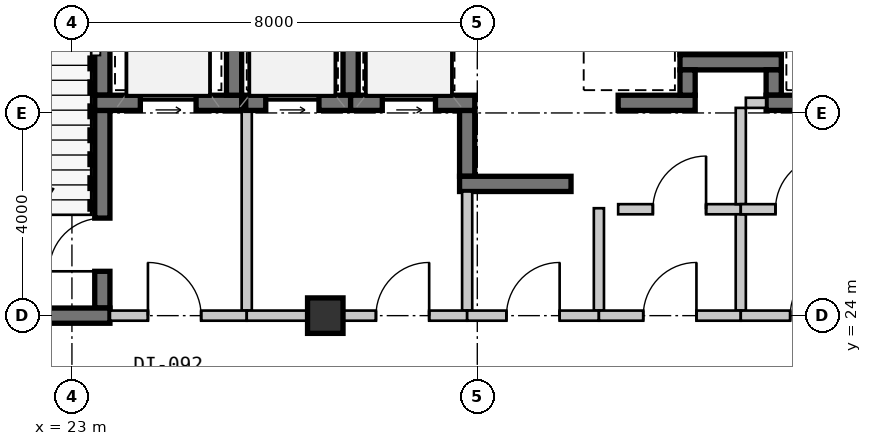
"""IFC4 building model, lengths in metres.
Left out: names, types, materials, properties, quantities, classifications, styles, units other than length and angle.
Written with IfcOpenShell. Run it as: python <this file> out.ifc"""

import sys

from ifc_helpers import new_model, si_unit, direction, frame, frame_2d, origin, origin_2d, place, context, subcontext, project, spatial, rectangle, extrude, source, transform, mapped, element, fill, save


model = new_model("IFC4")
c1 = context("Model", 3, precision=1e-05, world=origin(), true_north=direction((0.0, 1.0)))
c2 = subcontext(c1, "Body", "Model", "MODEL_VIEW")
j1 = project(units=[si_unit("LENGTHUNIT", "METRE"), si_unit("PLANEANGLEUNIT", "RADIAN")], contexts=[c1])
p1 = place(None, origin())
s1 = spatial("IfcSite", under=j1, at=p1, CompositionType="ELEMENT")
p2 = place(p1, origin())
s2 = spatial("IfcBuilding", under=s1, at=p2, CompositionType="ELEMENT")
p3 = place(p2, frame((0.0, 0.0, 80.85)))
s3 = spatial("IfcBuildingStorey", under=s2, at=p3, CompositionType="ELEMENT", Elevation=80.85)
m1 = source(origin(), c2, "Body", "SweptSolid", [
    extrude(rectangle(XDim=0.7, YDim=0.7, at=origin_2d()), origin(), (0.0, 0.0, 1.0), 3.15),
])
p4 = place(p3, frame((28.0, 24.0, 0.0), z_axis=(0.0, 0.0, 1.0), x_axis=(1.0, 0.0, 0.0)))
e1 = element("IfcColumn", 1, at=p4, inside=s3, PredefinedType="COLUMN", context=c2, shape_type="MappedRepresentation", body=[
    mapped(m1, transform((0.0, 0.0, 0.0), scale=1.0)),
])
m2 = source(origin(), c2, "Body", "SweptSolid", [
    extrude(rectangle(XDim=3.5, YDim=0.3, at=frame_2d((1.75, 0.0))), origin(), (0.0, 0.0, 1.0), 2.93),
])
p5 = place(p3, frame((23.6, 28.35, 0.0), z_axis=(0.0, 0.0, 1.0), x_axis=(0.0, 1.0, 0.0)))
e2 = element("IfcWall", 2, at=p5, inside=s3, PredefinedType="SHEAR", context=c2, shape_type="MappedRepresentation", body=[
    mapped(m2, transform((0.0, 0.0, 0.0), scale=1.0)),
])
m3 = source(origin(), c2, "Body", "SweptSolid", [
    extrude(rectangle(XDim=3.9, YDim=0.3, at=frame_2d((1.95, 0.0))), origin(), (0.0, 0.0, 1.0), 2.93),
])
p6 = place(p3, frame((23.6, 24.15, 0.0), z_axis=(0.0, 0.0, 1.0), x_axis=(0.0, 1.0, 0.0)))
e3 = element("IfcWall", 3, at=p6, inside=s3, PredefinedType="SHEAR", context=c2, shape_type="MappedRepresentation", body=[
    mapped(m3, transform((0.0, 0.0, 0.0), scale=1.0)),
])
m4 = source(origin(), c2, "Body", "SweptSolid", [
    extrude(rectangle(XDim=1.05, YDim=2.1, at=frame_2d((0.525, 1.05))), frame((0.0, 0.16, 0.0), z_axis=(0.0, -1.0, 0.0), x_axis=(1.0, 0.0, 0.0)), (0.0, 0.0, 1.0), 0.32),
])
p7 = place(p6, frame((0.725, 0.0, 0.0)))
e4 = element("IfcOpeningElement", 4, at=p7, cuts=e3, PredefinedType="OPENING", context=c2, shape_type="MappedRepresentation", body=[
    mapped(m4, transform((0.0, 0.0, 0.0), scale=1.0)),
])
m5 = source(origin(), c2, "Body", "SweptSolid", [
    extrude(rectangle(XDim=4.9, YDim=0.3, at=frame_2d((2.45, 0.0))), origin(), (0.0, 0.0, 1.0), 2.93),
])
p8 = place(p3, frame((18.85, 24.0, 0.0), z_axis=(0.0, 0.0, 1.0), x_axis=(1.0, 0.0, 0.0)))
e5 = element("IfcWall", 5, at=p8, inside=s3, PredefinedType="SHEAR", context=c2, shape_type="MappedRepresentation", body=[
    mapped(m5, transform((0.0, 0.0, 0.0), scale=1.0)),
])
m6 = source(origin(), c2, "Body", "SweptSolid", [
    extrude(rectangle(XDim=2.9, YDim=0.3, at=frame_2d((1.45, 0.0))), origin(), (0.0, 0.0, 1.0), 2.93),
])
p9 = place(p3, frame((23.45, 28.2, 0.0), z_axis=(0.0, 0.0, 1.0), x_axis=(1.0, 0.0, 0.0)))
e6 = element("IfcWall", 6, at=p9, inside=s3, PredefinedType="SHEAR", context=c2, shape_type="MappedRepresentation", body=[
    mapped(m6, transform((0.0, 0.0, 0.0), scale=1.0)),
])
m7 = source(origin(), c2, "Body", "SweptSolid", [
    extrude(rectangle(XDim=1.1, YDim=2.15, at=frame_2d((0.55, 1.075))), frame((0.0, 0.16, 0.0), z_axis=(0.0, -1.0, 0.0), x_axis=(1.0, 0.0, 0.0)), (0.0, 0.0, 1.0), 0.32),
])
p10 = place(p9, frame((0.9, 0.0, 0.0)))
e7 = element("IfcOpeningElement", 7, at=p10, cuts=e6, PredefinedType="OPENING", context=c2, shape_type="MappedRepresentation", body=[
    mapped(m7, transform((0.0, 0.0, 0.0), scale=1.0)),
])
p11 = place(p3, frame((26.2, 28.35, 0.0), z_axis=(0.0, 0.0, 1.0), x_axis=(0.0, 1.0, 0.0)))
e8 = element("IfcWall", 8, at=p11, inside=s3, PredefinedType="SHEAR", context=c2, shape_type="MappedRepresentation", body=[
    mapped(m2, transform((0.0, 0.0, 0.0), scale=1.0)),
])
m8 = source(origin(), c2, "Body", "SweptSolid", [
    extrude(rectangle(XDim=3.95, YDim=0.2, at=frame_2d((1.975, 0.0))), origin(), (0.0, 0.0, 1.0), 2.93),
])
p12 = place(p3, frame((26.45, 24.1, 0.0), z_axis=(0.0, 0.0, 1.0), x_axis=(0.0, 1.0, 0.0)))
e9 = element("IfcWall", 9, at=p12, inside=s3, PredefinedType="SOLIDWALL", context=c2, shape_type="MappedRepresentation", body=[
    mapped(m8, transform((0.0, 0.0, 0.0), scale=1.0)),
])
m9 = source(origin(), c2, "Body", "SweptSolid", [
    extrude(rectangle(XDim=2.7, YDim=0.2, at=frame_2d((1.35, 0.0))), origin(), (0.0, 0.0, 1.0), 2.47),
])
p13 = place(p3, frame((23.75, 24.0, 0.0), z_axis=(0.0, 0.0, 1.0), x_axis=(1.0, 0.0, 0.0)))
e10 = element("IfcWall", 10, at=p13, inside=s3, PredefinedType="SOLIDWALL", context=c2, shape_type="MappedRepresentation", body=[
    mapped(m9, transform((0.0, 0.0, 0.0), scale=1.0)),
])
m10 = source(origin(), c2, "Body", "SweptSolid", [
    extrude(rectangle(XDim=1.05, YDim=2.1, at=frame_2d((0.525, 1.05))), frame((0.0, 0.11, 0.0), z_axis=(0.0, -1.0, 0.0), x_axis=(1.0, 0.0, 0.0)), (0.0, 0.0, 1.0), 0.22),
])
p14 = place(p13, frame((0.75, 0.0, 0.0)))
e11 = element("IfcOpeningElement", 11, at=p14, cuts=e10, PredefinedType="OPENING", context=c2, shape_type="MappedRepresentation", body=[
    mapped(m10, transform((0.0, 0.0, 0.0), scale=1.0)),
])
m11 = source(origin(), c2, "Body", "SweptSolid", [
    extrude(rectangle(XDim=1.2, YDim=0.3, at=frame_2d((0.6, 0.0))), origin(), (0.0, 0.0, 1.0), 2.93),
])
for number, where, z_axis, x_axis in (
    (12, (35.15, 30.35, 0.0), (0.0, 0.0, 1.0), (0.0, -1.0, 0.0)),
    (13, (36.85, 29.15, 0.0), (0.0, 0.0, 1.0), (0.0, 1.0, 0.0)),
):
    element("IfcWall", number, at=place(p3, frame(where, z_axis=z_axis, x_axis=x_axis)), inside=s3, PredefinedType="SHEAR", context=c2, shape_type="MappedRepresentation", body=[
        mapped(m11, transform((0.0, 0.0, 0.0), scale=1.0)),
    ])
m12 = source(origin(), c2, "Body", "SweptSolid", [
    extrude(rectangle(XDim=2.0, YDim=0.3, at=frame_2d((1.0, 0.0))), origin(), (0.0, 0.0, 1.0), 2.93),
])
p15 = place(p3, frame((35.0, 29.0, 0.0), z_axis=(0.0, 0.0, 1.0), x_axis=(1.0, 0.0, 0.0)))
e14 = element("IfcWall", 14, at=p15, inside=s3, PredefinedType="SHEAR", context=c2, shape_type="MappedRepresentation", body=[
    mapped(m12, transform((0.0, 0.0, 0.0), scale=1.0)),
])
m13 = source(origin(), c2, "Body", "SweptSolid", [
    extrude(rectangle(XDim=1.3, YDim=0.3, at=frame_2d((0.65, 0.0))), origin(), (0.0, 0.0, 1.0), 2.93),
])
p16 = place(p3, frame((30.8, 28.05, 0.0), z_axis=(0.0, 0.0, 1.0), x_axis=(0.0, -1.0, 0.0)))
e15 = element("IfcWall", 15, at=p16, inside=s3, PredefinedType="SHEAR", context=c2, shape_type="MappedRepresentation", body=[
    mapped(m13, transform((0.0, 0.0, 0.0), scale=1.0)),
])
m14 = source(origin(), c2, "Body", "SweptSolid", [
    extrude(rectangle(XDim=2.2, YDim=0.3, at=frame_2d((1.1, 0.0))), origin(), (0.0, 0.0, 1.0), 2.93),
])
p17 = place(p3, frame((30.65, 26.6, 0.0), z_axis=(0.0, 0.0, 1.0), x_axis=(1.0, 0.0, 0.0)))
e16 = element("IfcWall", 16, at=p17, inside=s3, PredefinedType="SHEAR", context=c2, shape_type="MappedRepresentation", body=[
    mapped(m14, transform((0.0, 0.0, 0.0), scale=1.0)),
])
p18 = place(p3, frame((28.5, 28.35, 0.0), z_axis=(0.0, 0.0, 1.0), x_axis=(0.0, 1.0, 0.0)))
e17 = element("IfcWall", 17, at=p18, inside=s3, PredefinedType="SHEAR", context=c2, shape_type="MappedRepresentation", body=[
    mapped(m2, transform((0.0, 0.0, 0.0), scale=1.0)),
])
m15 = source(origin(), c2, "Body", "SweptSolid", [
    extrude(rectangle(XDim=2.07, YDim=0.3, at=frame_2d((1.035, 0.0))), origin(), (0.0, 0.0, 1.0), 2.93),
])
p19 = place(p3, frame((26.43, 28.2, 0.0), z_axis=(0.0, 0.0, 1.0), x_axis=(1.0, 0.0, 0.0)))
e18 = element("IfcWall", 18, at=p19, inside=s3, PredefinedType="SHEAR", context=c2, shape_type="MappedRepresentation", body=[
    mapped(m15, transform((0.0, 0.0, 0.0), scale=1.0)),
])
m16 = source(origin(), c2, "Body", "SweptSolid", [
    extrude(rectangle(XDim=1.05, YDim=2.15, at=frame_2d((0.525, 1.075))), frame((0.0, 0.16, 0.0), z_axis=(0.0, -1.0, 0.0), x_axis=(1.0, 0.0, 0.0)), (0.0, 0.0, 1.0), 0.32),
])
p20 = place(p19, frame((0.395, 0.0, 0.0)))
e19 = element("IfcOpeningElement", 19, at=p20, cuts=e18, PredefinedType="OPENING", context=c2, shape_type="MappedRepresentation", body=[
    mapped(m16, transform((0.0, 0.0, 0.0), scale=1.0)),
])
m17 = source(origin(), c2, "Body", "SweptSolid", [
    extrude(rectangle(XDim=2.45, YDim=0.3, at=frame_2d((1.225, 0.0))), origin(), (0.0, 0.0, 1.0), 2.93),
])
p21 = place(p3, frame((28.5, 28.2, 0.0), z_axis=(0.0, 0.0, 1.0), x_axis=(1.0, 0.0, 0.0)))
e20 = element("IfcWall", 20, at=p21, inside=s3, PredefinedType="SHEAR", context=c2, shape_type="MappedRepresentation", body=[
    mapped(m17, transform((0.0, 0.0, 0.0), scale=1.0)),
])
p22 = place(p21, frame((0.625, 0.0, 0.0)))
e21 = element("IfcOpeningElement", 21, at=p22, cuts=e20, PredefinedType="OPENING", context=c2, shape_type="MappedRepresentation", body=[
    mapped(m16, transform((0.0, 0.0, 0.0), scale=1.0)),
])
m18 = source(origin(), c2, "Body", "SweptSolid", [
    extrude(rectangle(XDim=2.35, YDim=0.2, at=frame_2d((1.175, 0.0))), origin(), (0.0, 0.0, 1.0), 2.93),
])
p23 = place(p3, frame((30.8, 26.45, 0.0), z_axis=(0.0, 0.0, 1.0), x_axis=(0.0, -1.0, 0.0)))
e22 = element("IfcWall", 22, at=p23, inside=s3, PredefinedType="SOLIDWALL", context=c2, shape_type="MappedRepresentation", body=[
    mapped(m18, transform((0.0, 0.0, 0.0), scale=1.0)),
])
m19 = source(origin(), c2, "Body", "SweptSolid", [
    extrude(rectangle(XDim=4.35, YDim=0.2, at=frame_2d((2.175, 0.0))), origin(), (0.0, 0.0, 1.0), 2.47),
])
p24 = place(p3, frame((30.8, 24.0, 0.0), z_axis=(0.0, 0.0, 1.0), x_axis=(-1.0, 0.0, 0.0)))
e23 = element("IfcWall", 23, at=p24, inside=s3, PredefinedType="SOLIDWALL", context=c2, shape_type="MappedRepresentation", body=[
    mapped(m19, transform((0.0, 0.0, 0.0), scale=1.0)),
])
p25 = place(p24, frame((0.75, 0.0, 0.0)))
e24 = element("IfcOpeningElement", 24, at=p25, cuts=e23, PredefinedType="OPENING", context=c2, shape_type="MappedRepresentation", body=[
    mapped(m10, transform((0.0, 0.0, 0.0), scale=1.0)),
])
m20 = source(origin(), c2, "Body", "SweptSolid", [
    extrude(rectangle(XDim=1.52, YDim=0.3, at=frame_2d((0.76, 0.0))), origin(), (0.0, 0.0, 1.0), 2.93),
])
p26 = place(p3, frame((33.78, 28.2, 0.0), z_axis=(0.0, 0.0, 1.0), x_axis=(1.0, 0.0, 0.0)))
e25 = element("IfcWall", 25, at=p26, inside=s3, PredefinedType="SHEAR", context=c2, shape_type="MappedRepresentation", body=[
    mapped(m20, transform((0.0, 0.0, 0.0), scale=1.0)),
])
m21 = source(origin(), c2, "Body", "SweptSolid", [
    extrude(rectangle(XDim=0.5, YDim=0.3, at=frame_2d((0.25, 0.0))), origin(), (0.0, 0.0, 1.0), 2.93),
])
for number, where, z_axis, x_axis in (
    (26, (35.15, 28.35, 0.0), (0.0, 0.0, 1.0), (0.0, 1.0, 0.0)),
    (27, (36.85, 28.85, 0.0), (0.0, 0.0, 1.0), (0.0, -1.0, 0.0)),
):
    element("IfcWall", number, at=place(p3, frame(where, z_axis=z_axis, x_axis=x_axis)), inside=s3, PredefinedType="SHEAR", context=c2, shape_type="MappedRepresentation", body=[
        mapped(m21, transform((0.0, 0.0, 0.0), scale=1.0)),
    ])
m22 = source(origin(), c2, "Body", "SweptSolid", [
    extrude(rectangle(XDim=1.92, YDim=0.3, at=frame_2d((0.96, 0.0))), origin(), (0.0, 0.0, 1.0), 2.93),
])
p27 = place(p3, frame((36.7, 28.2, 0.0), z_axis=(0.0, 0.0, 1.0), x_axis=(1.0, 0.0, 0.0)))
e28 = element("IfcWall", 28, at=p27, inside=s3, PredefinedType="SHEAR", context=c2, shape_type="MappedRepresentation", body=[
    mapped(m22, transform((0.0, 0.0, 0.0), scale=1.0)),
])
m23 = source(origin(), c2, "Body", "SweptSolid", [
    extrude(rectangle(XDim=2.02, YDim=0.2, at=frame_2d((1.01, 0.0))), origin(), (0.0, 0.0, 1.0), 2.93),
])
p28 = place(p3, frame((33.4, 26.12, 0.0), z_axis=(0.0, 0.0, 1.0), x_axis=(0.0, -1.0, 0.0)))
e29 = element("IfcWall", 29, at=p28, inside=s3, PredefinedType="SOLIDWALL", context=c2, shape_type="MappedRepresentation", body=[
    mapped(m23, transform((0.0, 0.0, 0.0), scale=1.0)),
])
m24 = source(origin(), c2, "Body", "SweptSolid", [
    extrude(rectangle(XDim=2.6, YDim=0.2, at=frame_2d((1.3, 0.0))), origin(), (0.0, 0.0, 1.0), 2.47),
])
p29 = place(p3, frame((33.4, 24.0, 0.0), z_axis=(0.0, 0.0, 1.0), x_axis=(-1.0, 0.0, 0.0)))
e30 = element("IfcWall", 30, at=p29, inside=s3, PredefinedType="SOLIDWALL", context=c2, shape_type="MappedRepresentation", body=[
    mapped(m24, transform((0.0, 0.0, 0.0), scale=1.0)),
])
p30 = place(p29, frame((0.775, 0.0, 0.0)))
e31 = element("IfcOpeningElement", 31, at=p30, cuts=e30, PredefinedType="OPENING", context=c2, shape_type="MappedRepresentation", body=[
    mapped(m10, transform((0.0, 0.0, 0.0), scale=1.0)),
])
m25 = source(origin(), c2, "Body", "SweptSolid", [
    extrude(rectangle(XDim=2.42, YDim=0.2, at=frame_2d((1.21, 0.0))), origin(), (0.0, 0.0, 1.0), 2.93),
])
p31 = place(p3, frame((33.78, 26.1, 0.0), z_axis=(0.0, 0.0, 1.0), x_axis=(1.0, 0.0, 0.0)))
e32 = element("IfcWall", 32, at=p31, inside=s3, PredefinedType="SOLIDWALL", context=c2, shape_type="MappedRepresentation", body=[
    mapped(m25, transform((0.0, 0.0, 0.0), scale=1.0)),
])
p32 = place(p31, frame((0.685, 0.0, 0.0)))
e33 = element("IfcOpeningElement", 33, at=p32, cuts=e32, PredefinedType="OPENING", context=c2, shape_type="MappedRepresentation", body=[
    mapped(m10, transform((0.0, 0.0, 0.0), scale=1.0)),
])
m26 = source(origin(), c2, "Body", "SweptSolid", [
    extrude(rectangle(XDim=1.9, YDim=0.2, at=frame_2d((0.95, 0.0))), origin(), (0.0, 0.0, 1.0), 2.93),
])
p33 = place(p3, frame((36.2, 26.0, 0.0), z_axis=(0.0, 0.0, 1.0), x_axis=(0.0, -1.0, 0.0)))
e34 = element("IfcWall", 34, at=p33, inside=s3, PredefinedType="SOLIDWALL", context=c2, shape_type="MappedRepresentation", body=[
    mapped(m26, transform((0.0, 0.0, 0.0), scale=1.0)),
])
m27 = source(origin(), c2, "Body", "SweptSolid", [
    extrude(rectangle(XDim=2.8, YDim=0.2, at=frame_2d((1.4, 0.0))), origin(), (0.0, 0.0, 1.0), 2.47),
])
p34 = place(p3, frame((36.2, 24.0, 0.0), z_axis=(0.0, 0.0, 1.0), x_axis=(-1.0, 0.0, 0.0)))
e35 = element("IfcWall", 35, at=p34, inside=s3, PredefinedType="SOLIDWALL", context=c2, shape_type="MappedRepresentation", body=[
    mapped(m27, transform((0.0, 0.0, 0.0), scale=1.0)),
])
p35 = place(p34, frame((0.875, 0.0, 0.0)))
e36 = element("IfcOpeningElement", 36, at=p35, cuts=e35, PredefinedType="OPENING", context=c2, shape_type="MappedRepresentation", body=[
    mapped(m10, transform((0.0, 0.0, 0.0), scale=1.0)),
])
m28 = source(origin(), c2, "Body", "SweptSolid", [
    extrude(rectangle(XDim=1.9, YDim=0.2, at=frame_2d((0.95, 0.0))), origin(), (0.0, 0.0, 1.0), 2.93),
])
p36 = place(p3, frame((36.2, 28.1, 0.0), z_axis=(0.0, 0.0, 1.0), x_axis=(0.0, -1.0, 0.0)))
e37 = element("IfcWall", 37, at=p36, inside=s3, PredefinedType="SOLIDWALL", context=c2, shape_type="MappedRepresentation", body=[
    mapped(m28, transform((0.0, 0.0, 0.0), scale=1.0)),
])
m29 = source(origin(), c2, "Body", "SweptSolid", [
    extrude(rectangle(XDim=0.4, YDim=0.2, at=frame_2d((0.2, 0.0))), origin(), (0.0, 0.0, 1.0), 2.93),
])
p37 = place(p3, frame((36.7, 28.2, 0.0), z_axis=(0.0, 0.0, 1.0), x_axis=(-1.0, 0.0, 0.0)))
e38 = element("IfcWall", 38, at=p37, inside=s3, PredefinedType="SOLIDWALL", context=c2, shape_type="MappedRepresentation", body=[
    mapped(m29, transform((0.0, 0.0, 0.0), scale=1.0)),
])
m30 = source(origin(), c2, "Body", "SweptSolid", [
    extrude(rectangle(XDim=2.42, YDim=0.2, at=frame_2d((1.21, 0.0))), origin(), (0.0, 0.0, 1.0), 2.93),
])
p38 = place(p3, frame((36.2, 26.1, 0.0), z_axis=(0.0, 0.0, 1.0), x_axis=(1.0, 0.0, 0.0)))
e39 = element("IfcWall", 39, at=p38, inside=s3, PredefinedType="SOLIDWALL", context=c2, shape_type="MappedRepresentation", body=[
    mapped(m30, transform((0.0, 0.0, 0.0), scale=1.0)),
])
p39 = place(p38, frame((0.685, 0.0, 0.0)))
e40 = element("IfcOpeningElement", 40, at=p39, cuts=e39, PredefinedType="OPENING", context=c2, shape_type="MappedRepresentation", body=[
    mapped(m10, transform((0.0, 0.0, 0.0), scale=1.0)),
])
m31 = source(origin(), c2, "Body", "SweptSolid", [
    extrude(rectangle(XDim=3.0, YDim=0.2, at=frame_2d((1.5, 0.0))), origin(), (0.0, 0.0, 1.0), 2.47),
])
p40 = place(p3, frame((39.2, 24.0, 0.0), z_axis=(0.0, 0.0, 1.0), x_axis=(-1.0, 0.0, 0.0)))
e41 = element("IfcWall", 41, at=p40, inside=s3, PredefinedType="SOLIDWALL", context=c2, shape_type="MappedRepresentation", body=[
    mapped(m31, transform((0.0, 0.0, 0.0), scale=1.0)),
])
p41 = place(p40, frame((0.975, 0.0, 0.0)))
e42 = element("IfcOpeningElement", 42, at=p41, cuts=e41, PredefinedType="OPENING", context=c2, shape_type="MappedRepresentation", body=[
    mapped(m10, transform((0.0, 0.0, 0.0), scale=1.0)),
])
m32 = source(origin(), c2, "Body", "SweptSolid", [
    extrude(rectangle(XDim=1.05, YDim=2.1, at=frame_2d((0.525, 1.05))), frame((0.0, 0.025, 0.0), z_axis=(0.0, -1.0, 0.0), x_axis=(1.0, 0.0, 0.0)), (0.0, 0.0, 1.0), 0.05),
])
p42 = place(p7, origin())
e43 = element("IfcDoor", 43, at=p42, inside=s3, OperationType="SINGLE_SWING_LEFT", PredefinedType="DOOR", context=c2, shape_type="MappedRepresentation", body=[
    mapped(m32, transform((0.0, 0.0, 0.0), scale=1.0)),
])
fill(e4, e43)
m33 = source(origin(), c2, "Body", "SweptSolid", [
    extrude(rectangle(XDim=1.1, YDim=2.15, at=frame_2d((0.55, 1.075))), frame((0.0, 0.025, 0.0), z_axis=(0.0, -1.0, 0.0), x_axis=(1.0, 0.0, 0.0)), (0.0, 0.0, 1.0), 0.05),
])
p43 = place(p10, origin())
e44 = element("IfcDoor", 44, at=p43, inside=s3, OperationType="SLIDING_TO_LEFT", PredefinedType="DOOR", context=c2, shape_type="MappedRepresentation", body=[
    mapped(m33, transform((0.0, 0.0, 0.0), scale=1.0)),
])
fill(e7, e44)
p44 = place(p14, origin())
e45 = element("IfcDoor", 45, at=p44, inside=s3, OperationType="SINGLE_SWING_LEFT", PredefinedType="DOOR", context=c2, shape_type="MappedRepresentation", body=[
    mapped(m32, transform((0.0, 0.0, 0.0), scale=1.0)),
])
fill(e11, e45)
m34 = source(origin(), c2, "Body", "SweptSolid", [
    extrude(rectangle(XDim=1.05, YDim=2.15, at=frame_2d((0.525, 1.075))), frame((0.0, 0.025, 0.0), z_axis=(0.0, -1.0, 0.0), x_axis=(1.0, 0.0, 0.0)), (0.0, 0.0, 1.0), 0.05),
])
p45 = place(p20, origin())
e46 = element("IfcDoor", 46, at=p45, inside=s3, OperationType="SLIDING_TO_LEFT", PredefinedType="DOOR", context=c2, shape_type="MappedRepresentation", body=[
    mapped(m34, transform((0.0, 0.0, 0.0), scale=1.0)),
])
fill(e19, e46)
p46 = place(p22, origin())
e47 = element("IfcDoor", 47, at=p46, inside=s3, OperationType="SLIDING_TO_LEFT", PredefinedType="DOOR", context=c2, shape_type="MappedRepresentation", body=[
    mapped(m34, transform((0.0, 0.0, 0.0), scale=1.0)),
])
fill(e21, e47)
p47 = place(p25, frame((1.05, 0.0, 0.0), z_axis=(0.0, 0.0, 1.0), x_axis=(-1.0, 0.0, 0.0)))
e48 = element("IfcDoor", 48, at=p47, inside=s3, OperationType="SINGLE_SWING_RIGHT", PredefinedType="DOOR", context=c2, shape_type="MappedRepresentation", body=[
    mapped(m32, transform((0.0, 0.0, 0.0), scale=1.0)),
])
fill(e24, e48)
p48 = place(p30, frame((1.05, 0.0, 0.0), z_axis=(0.0, 0.0, 1.0), x_axis=(-1.0, 0.0, 0.0)))
e49 = element("IfcDoor", 49, at=p48, inside=s3, OperationType="SINGLE_SWING_RIGHT", PredefinedType="DOOR", context=c2, shape_type="MappedRepresentation", body=[
    mapped(m32, transform((0.0, 0.0, 0.0), scale=1.0)),
])
fill(e31, e49)
p49 = place(p32, origin())
e50 = element("IfcDoor", 50, at=p49, inside=s3, OperationType="SINGLE_SWING_RIGHT", PredefinedType="DOOR", context=c2, shape_type="MappedRepresentation", body=[
    mapped(m32, transform((0.0, 0.0, 0.0), scale=1.0)),
])
fill(e33, e50)
p50 = place(p35, frame((1.05, 0.0, 0.0), z_axis=(0.0, 0.0, 1.0), x_axis=(-1.0, 0.0, 0.0)))
e51 = element("IfcDoor", 51, at=p50, inside=s3, OperationType="SINGLE_SWING_RIGHT", PredefinedType="DOOR", context=c2, shape_type="MappedRepresentation", body=[
    mapped(m32, transform((0.0, 0.0, 0.0), scale=1.0)),
])
fill(e36, e51)
p51 = place(p39, origin())
e52 = element("IfcDoor", 52, at=p51, inside=s3, OperationType="SINGLE_SWING_RIGHT", PredefinedType="DOOR", context=c2, shape_type="MappedRepresentation", body=[
    mapped(m32, transform((0.0, 0.0, 0.0), scale=1.0)),
])
fill(e40, e52)
p52 = place(p41, frame((1.05, 0.0, 0.0), z_axis=(0.0, 0.0, 1.0), x_axis=(-1.0, 0.0, 0.0)))
e53 = element("IfcDoor", 53, at=p52, inside=s3, OperationType="SINGLE_SWING_RIGHT", PredefinedType="DOOR", context=c2, shape_type="MappedRepresentation", body=[
    mapped(m32, transform((0.0, 0.0, 0.0), scale=1.0)),
])
fill(e42, e53)
save(model, sys.argv[1])
